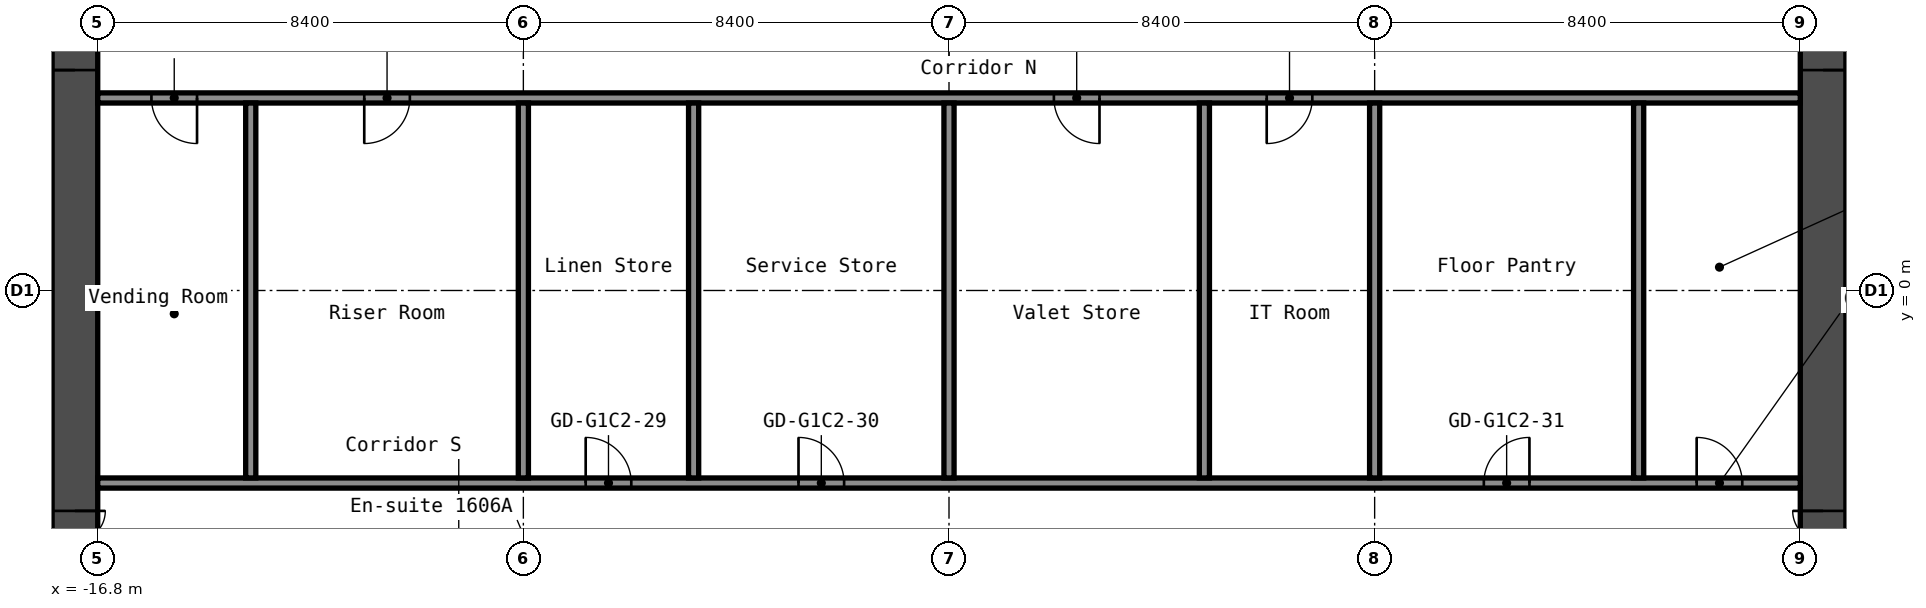
"""IFC4 building model, lengths in metres.
Left out: names, types, materials, properties, quantities, classifications, styles, units other than length and angle.
Written with IfcOpenShell. Run it as: python <this file> out.ifc"""

import sys

from ifc_helpers import new_model, si_unit, direction, frame, frame_2d, origin, place, context, subcontext, project, spatial, rectangle, extrude, element, fill, save


model = new_model("IFC4")
c1 = context("Model", 3, precision=1e-05, world=origin(), true_north=direction((0.0, 1.0)))
c2 = subcontext(c1, "Body", "Model", "MODEL_VIEW")
j1 = project(units=[si_unit("LENGTHUNIT", "METRE"), si_unit("PLANEANGLEUNIT", "RADIAN")], contexts=[c1])
p1 = place(None, origin())
s1 = spatial("IfcSite", under=j1, at=p1, CompositionType="ELEMENT")
p2 = place(p1, origin())
s2 = spatial("IfcBuilding", under=s1, at=p2, CompositionType="ELEMENT")
p3 = place(p2, frame((0.0, 0.0, 58.2)))
s3 = spatial("IfcBuildingStorey", under=s2, at=p3, CompositionType="ELEMENT", Elevation=58.2)
p4 = place(p3, frame((-17.25, -8.4, 0.0), z_axis=(0.0, 0.0, 1.0), x_axis=(0.0, 1.0, 0.0)))
e1 = element("IfcWall", 1, at=p4, inside=s3, PredefinedType="SHEAR", context=c2, shape_type="SweptSolid", body=[
    extrude(rectangle(XDim=16.8, YDim=0.9, at=frame_2d((8.4, 0.0))), origin(), (0.0, 0.0, 1.0), 2.8),
])
p5 = place(p4, frame((12.75, 0.0, 0.0)))
e2 = element("IfcOpeningElement", 2, at=p5, cuts=e1, PredefinedType="OPENING", context=c2, shape_type="SweptSolid", body=[
    extrude(rectangle(XDim=1.2, YDim=2.1, at=frame_2d((0.6, 1.05))), frame((0.0, 0.46, 0.0), z_axis=(0.0, -1.0, 0.0), x_axis=(1.0, 0.0, 0.0)), (0.0, 0.0, 1.0), 0.92),
])
p6 = place(p4, frame((2.85, 0.0, 0.0)))
e3 = element("IfcOpeningElement", 3, at=p6, cuts=e1, PredefinedType="OPENING", context=c2, shape_type="SweptSolid", body=[
    extrude(rectangle(XDim=1.2, YDim=2.1, at=frame_2d((0.6, 1.05))), frame((0.0, 0.46, 0.0), z_axis=(0.0, -1.0, 0.0), x_axis=(1.0, 0.0, 0.0)), (0.0, 0.0, 1.0), 0.92),
])
p7 = place(p3, frame((17.25, -8.4, 0.0), z_axis=(0.0, 0.0, 1.0), x_axis=(0.0, 1.0, 0.0)))
e4 = element("IfcWall", 4, at=p7, inside=s3, PredefinedType="SHEAR", context=c2, shape_type="SweptSolid", body=[
    extrude(rectangle(XDim=16.8, YDim=0.9, at=frame_2d((8.4, 0.0))), origin(), (0.0, 0.0, 1.0), 2.8),
])
p8 = place(p7, frame((12.75, 0.0, 0.0)))
e5 = element("IfcOpeningElement", 5, at=p8, cuts=e4, PredefinedType="OPENING", context=c2, shape_type="SweptSolid", body=[
    extrude(rectangle(XDim=1.2, YDim=2.1, at=frame_2d((0.6, 1.05))), frame((0.0, 0.46, 0.0), z_axis=(0.0, -1.0, 0.0), x_axis=(1.0, 0.0, 0.0)), (0.0, 0.0, 1.0), 0.92),
])
p9 = place(p7, frame((2.85, 0.0, 0.0)))
e6 = element("IfcOpeningElement", 6, at=p9, cuts=e4, PredefinedType="OPENING", context=c2, shape_type="SweptSolid", body=[
    extrude(rectangle(XDim=1.2, YDim=2.1, at=frame_2d((0.6, 1.05))), frame((0.0, 0.46, 0.0), z_axis=(0.0, -1.0, 0.0), x_axis=(1.0, 0.0, 0.0)), (0.0, 0.0, 1.0), 0.92),
])
p10 = place(p3, frame((-16.8, -3.8, 0.0), z_axis=(0.0, 0.0, 1.0), x_axis=(1.0, 0.0, 0.0)))
e7 = element("IfcWall", 7, at=p10, inside=s3, PredefinedType="PARTITIONING", context=c2, shape_type="SweptSolid", body=[
    extrude(rectangle(XDim=33.6, YDim=0.2, at=frame_2d((16.8, 0.0))), origin(), (0.0, 0.0, 1.0), 2.8),
])
p11 = place(p10, frame((9.63, 0.0, 0.0)))
e8 = element("IfcOpeningElement", 8, at=p11, cuts=e7, PredefinedType="OPENING", context=c2, shape_type="SweptSolid", body=[
    extrude(rectangle(XDim=0.9, YDim=2.1, at=frame_2d((0.45, 1.05))), frame((0.0, 0.11, 0.0), z_axis=(0.0, -1.0, 0.0), x_axis=(1.0, 0.0, 0.0)), (0.0, 0.0, 1.0), 0.22),
])
p12 = place(p10, frame((13.83, 0.0, 0.0)))
e9 = element("IfcOpeningElement", 9, at=p12, cuts=e7, PredefinedType="OPENING", context=c2, shape_type="SweptSolid", body=[
    extrude(rectangle(XDim=0.9, YDim=2.1, at=frame_2d((0.45, 1.05))), frame((0.0, 0.11, 0.0), z_axis=(0.0, -1.0, 0.0), x_axis=(1.0, 0.0, 0.0)), (0.0, 0.0, 1.0), 0.22),
])
p13 = place(p10, frame((27.355, 0.0, 0.0)))
e10 = element("IfcOpeningElement", 10, at=p13, cuts=e7, PredefinedType="OPENING", context=c2, shape_type="SweptSolid", body=[
    extrude(rectangle(XDim=0.9, YDim=2.1, at=frame_2d((0.45, 1.05))), frame((0.0, 0.11, 0.0), z_axis=(0.0, -1.0, 0.0), x_axis=(1.0, 0.0, 0.0)), (0.0, 0.0, 1.0), 0.22),
])
p14 = place(p10, frame((31.555, 0.0, 0.0)))
e11 = element("IfcOpeningElement", 11, at=p14, cuts=e7, PredefinedType="OPENING", context=c2, shape_type="SweptSolid", body=[
    extrude(rectangle(XDim=0.9, YDim=2.1, at=frame_2d((0.45, 1.05))), frame((0.0, 0.11, 0.0), z_axis=(0.0, -1.0, 0.0), x_axis=(1.0, 0.0, 0.0)), (0.0, 0.0, 1.0), 0.22),
])
p15 = place(p3, frame((-16.8, 3.8, 0.0), z_axis=(0.0, 0.0, 1.0), x_axis=(1.0, 0.0, 0.0)))
e12 = element("IfcWall", 12, at=p15, inside=s3, PredefinedType="PARTITIONING", context=c2, shape_type="SweptSolid", body=[
    extrude(rectangle(XDim=33.6, YDim=0.2, at=frame_2d((16.8, 0.0))), origin(), (0.0, 0.0, 1.0), 2.8),
])
p16 = place(p15, frame((1.06, 0.0, 0.0)))
e13 = element("IfcOpeningElement", 13, at=p16, cuts=e12, PredefinedType="OPENING", context=c2, shape_type="SweptSolid", body=[
    extrude(rectangle(XDim=0.9, YDim=2.1, at=frame_2d((0.45, 1.05))), frame((0.0, 0.11, 0.0), z_axis=(0.0, -1.0, 0.0), x_axis=(1.0, 0.0, 0.0)), (0.0, 0.0, 1.0), 0.22),
])
p17 = place(p15, frame((5.26, 0.0, 0.0)))
e14 = element("IfcOpeningElement", 14, at=p17, cuts=e12, PredefinedType="OPENING", context=c2, shape_type="SweptSolid", body=[
    extrude(rectangle(XDim=0.9, YDim=2.1, at=frame_2d((0.45, 1.05))), frame((0.0, 0.11, 0.0), z_axis=(0.0, -1.0, 0.0), x_axis=(1.0, 0.0, 0.0)), (0.0, 0.0, 1.0), 0.22),
])
p18 = place(p15, frame((18.87, 0.0, 0.0)))
e15 = element("IfcOpeningElement", 15, at=p18, cuts=e12, PredefinedType="OPENING", context=c2, shape_type="SweptSolid", body=[
    extrude(rectangle(XDim=0.9, YDim=2.1, at=frame_2d((0.45, 1.05))), frame((0.0, 0.11, 0.0), z_axis=(0.0, -1.0, 0.0), x_axis=(1.0, 0.0, 0.0)), (0.0, 0.0, 1.0), 0.22),
])
p19 = place(p15, frame((23.07, 0.0, 0.0)))
e16 = element("IfcOpeningElement", 16, at=p19, cuts=e12, PredefinedType="OPENING", context=c2, shape_type="SweptSolid", body=[
    extrude(rectangle(XDim=0.9, YDim=2.1, at=frame_2d((0.45, 1.05))), frame((0.0, 0.11, 0.0), z_axis=(0.0, -1.0, 0.0), x_axis=(1.0, 0.0, 0.0)), (0.0, 0.0, 1.0), 0.22),
])
for number, where, z_axis, x_axis in (
    (17, (-13.78, -3.7, 0.0), (0.0, 0.0, 1.0), (0.0, 1.0, 0.0)),
    (18, (-8.4, -3.7, 0.0), (0.0, 0.0, 1.0), (0.0, 1.0, 0.0)),
    (19, (-5.04, -3.7, 0.0), (0.0, 0.0, 1.0), (0.0, 1.0, 0.0)),
    (20, (0.0, -3.7, 0.0), (0.0, 0.0, 1.0), (0.0, 1.0, 0.0)),
    (21, (5.04, -3.7, 0.0), (0.0, 0.0, 1.0), (0.0, 1.0, 0.0)),
    (22, (8.4, -3.7, 0.0), (0.0, 0.0, 1.0), (0.0, 1.0, 0.0)),
    (23, (13.61, -3.7, 0.0), (0.0, 0.0, 1.0), (0.0, 1.0, 0.0)),
):
    element("IfcWall", number, at=place(p3, frame(where, z_axis=z_axis, x_axis=x_axis)), inside=s3, PredefinedType="PARTITIONING", context=c2, shape_type="SweptSolid", body=[
        extrude(rectangle(XDim=7.4, YDim=0.2, at=frame_2d((3.7, 0.0))), origin(), (0.0, 0.0, 1.0), 2.8),
    ])
p20 = place(p5, origin())
e24 = element("IfcDoor", 24, at=p20, inside=s3, OperationType="DOUBLE_DOOR_SINGLE_SWING", PredefinedType="DOOR", context=c2, shape_type="SweptSolid", body=[
    extrude(rectangle(XDim=1.2, YDim=2.1, at=frame_2d((0.6, 1.05))), frame((0.0, 0.025, 0.0), z_axis=(0.0, -1.0, 0.0), x_axis=(1.0, 0.0, 0.0)), (0.0, 0.0, 1.0), 0.05),
])
fill(e2, e24)
p21 = place(p6, origin())
e25 = element("IfcDoor", 25, at=p21, inside=s3, OperationType="DOUBLE_DOOR_SINGLE_SWING", PredefinedType="DOOR", context=c2, shape_type="SweptSolid", body=[
    extrude(rectangle(XDim=1.2, YDim=2.1, at=frame_2d((0.6, 1.05))), frame((0.0, 0.025, 0.0), z_axis=(0.0, -1.0, 0.0), x_axis=(1.0, 0.0, 0.0)), (0.0, 0.0, 1.0), 0.05),
])
fill(e3, e25)
p22 = place(p8, origin())
e26 = element("IfcDoor", 26, at=p22, inside=s3, OperationType="DOUBLE_DOOR_SINGLE_SWING", PredefinedType="DOOR", context=c2, shape_type="SweptSolid", body=[
    extrude(rectangle(XDim=1.2, YDim=2.1, at=frame_2d((0.6, 1.05))), frame((0.0, 0.025, 0.0), z_axis=(0.0, -1.0, 0.0), x_axis=(1.0, 0.0, 0.0)), (0.0, 0.0, 1.0), 0.05),
])
fill(e5, e26)
p23 = place(p9, origin())
e27 = element("IfcDoor", 27, at=p23, inside=s3, OperationType="DOUBLE_DOOR_SINGLE_SWING", PredefinedType="DOOR", context=c2, shape_type="SweptSolid", body=[
    extrude(rectangle(XDim=1.2, YDim=2.1, at=frame_2d((0.6, 1.05))), frame((0.0, 0.025, 0.0), z_axis=(0.0, -1.0, 0.0), x_axis=(1.0, 0.0, 0.0)), (0.0, 0.0, 1.0), 0.05),
])
fill(e6, e27)
p24 = place(p11, origin())
e28 = element("IfcDoor", 28, at=p24, inside=s3, OperationType="SINGLE_SWING_RIGHT", PredefinedType="DOOR", context=c2, shape_type="SweptSolid", body=[
    extrude(rectangle(XDim=0.9, YDim=2.1, at=frame_2d((0.45, 1.05))), frame((0.0, 0.025, 0.0), z_axis=(0.0, -1.0, 0.0), x_axis=(1.0, 0.0, 0.0)), (0.0, 0.0, 1.0), 0.05),
])
fill(e8, e28)
p25 = place(p12, origin())
e29 = element("IfcDoor", 29, at=p25, inside=s3, OperationType="SINGLE_SWING_RIGHT", PredefinedType="DOOR", context=c2, shape_type="SweptSolid", body=[
    extrude(rectangle(XDim=0.9, YDim=2.1, at=frame_2d((0.45, 1.05))), frame((0.0, 0.025, 0.0), z_axis=(0.0, -1.0, 0.0), x_axis=(1.0, 0.0, 0.0)), (0.0, 0.0, 1.0), 0.05),
])
fill(e9, e29)
p26 = place(p13, origin())
e30 = element("IfcDoor", 30, at=p26, inside=s3, OperationType="SINGLE_SWING_LEFT", PredefinedType="DOOR", context=c2, shape_type="SweptSolid", body=[
    extrude(rectangle(XDim=0.9, YDim=2.1, at=frame_2d((0.45, 1.05))), frame((0.0, 0.025, 0.0), z_axis=(0.0, -1.0, 0.0), x_axis=(1.0, 0.0, 0.0)), (0.0, 0.0, 1.0), 0.05),
])
fill(e10, e30)
p27 = place(p14, origin())
e31 = element("IfcDoor", 31, at=p27, inside=s3, OperationType="SINGLE_SWING_RIGHT", PredefinedType="DOOR", context=c2, shape_type="SweptSolid", body=[
    extrude(rectangle(XDim=0.9, YDim=2.1, at=frame_2d((0.45, 1.05))), frame((0.0, 0.025, 0.0), z_axis=(0.0, -1.0, 0.0), x_axis=(1.0, 0.0, 0.0)), (0.0, 0.0, 1.0), 0.05),
])
fill(e11, e31)
p28 = place(p16, origin())
e32 = element("IfcDoor", 32, at=p28, inside=s3, OperationType="SINGLE_SWING_RIGHT", PredefinedType="DOOR", context=c2, shape_type="SweptSolid", body=[
    extrude(rectangle(XDim=0.9, YDim=2.1, at=frame_2d((0.45, 1.05))), frame((0.0, 0.025, 0.0), z_axis=(0.0, -1.0, 0.0), x_axis=(1.0, 0.0, 0.0)), (0.0, 0.0, 1.0), 0.05),
])
fill(e13, e32)
p29 = place(p17, origin())
e33 = element("IfcDoor", 33, at=p29, inside=s3, OperationType="SINGLE_SWING_LEFT", PredefinedType="DOOR", context=c2, shape_type="SweptSolid", body=[
    extrude(rectangle(XDim=0.9, YDim=2.1, at=frame_2d((0.45, 1.05))), frame((0.0, 0.025, 0.0), z_axis=(0.0, -1.0, 0.0), x_axis=(1.0, 0.0, 0.0)), (0.0, 0.0, 1.0), 0.05),
])
fill(e14, e33)
p30 = place(p18, origin())
e34 = element("IfcDoor", 34, at=p30, inside=s3, OperationType="SINGLE_SWING_RIGHT", PredefinedType="DOOR", context=c2, shape_type="SweptSolid", body=[
    extrude(rectangle(XDim=0.9, YDim=2.1, at=frame_2d((0.45, 1.05))), frame((0.0, 0.025, 0.0), z_axis=(0.0, -1.0, 0.0), x_axis=(1.0, 0.0, 0.0)), (0.0, 0.0, 1.0), 0.05),
])
fill(e15, e34)
p31 = place(p19, origin())
e35 = element("IfcDoor", 35, at=p31, inside=s3, OperationType="SINGLE_SWING_LEFT", PredefinedType="DOOR", context=c2, shape_type="SweptSolid", body=[
    extrude(rectangle(XDim=0.9, YDim=2.1, at=frame_2d((0.45, 1.05))), frame((0.0, 0.025, 0.0), z_axis=(0.0, -1.0, 0.0), x_axis=(1.0, 0.0, 0.0)), (0.0, 0.0, 1.0), 0.05),
])
fill(e16, e35)
save(model, sys.argv[1])
